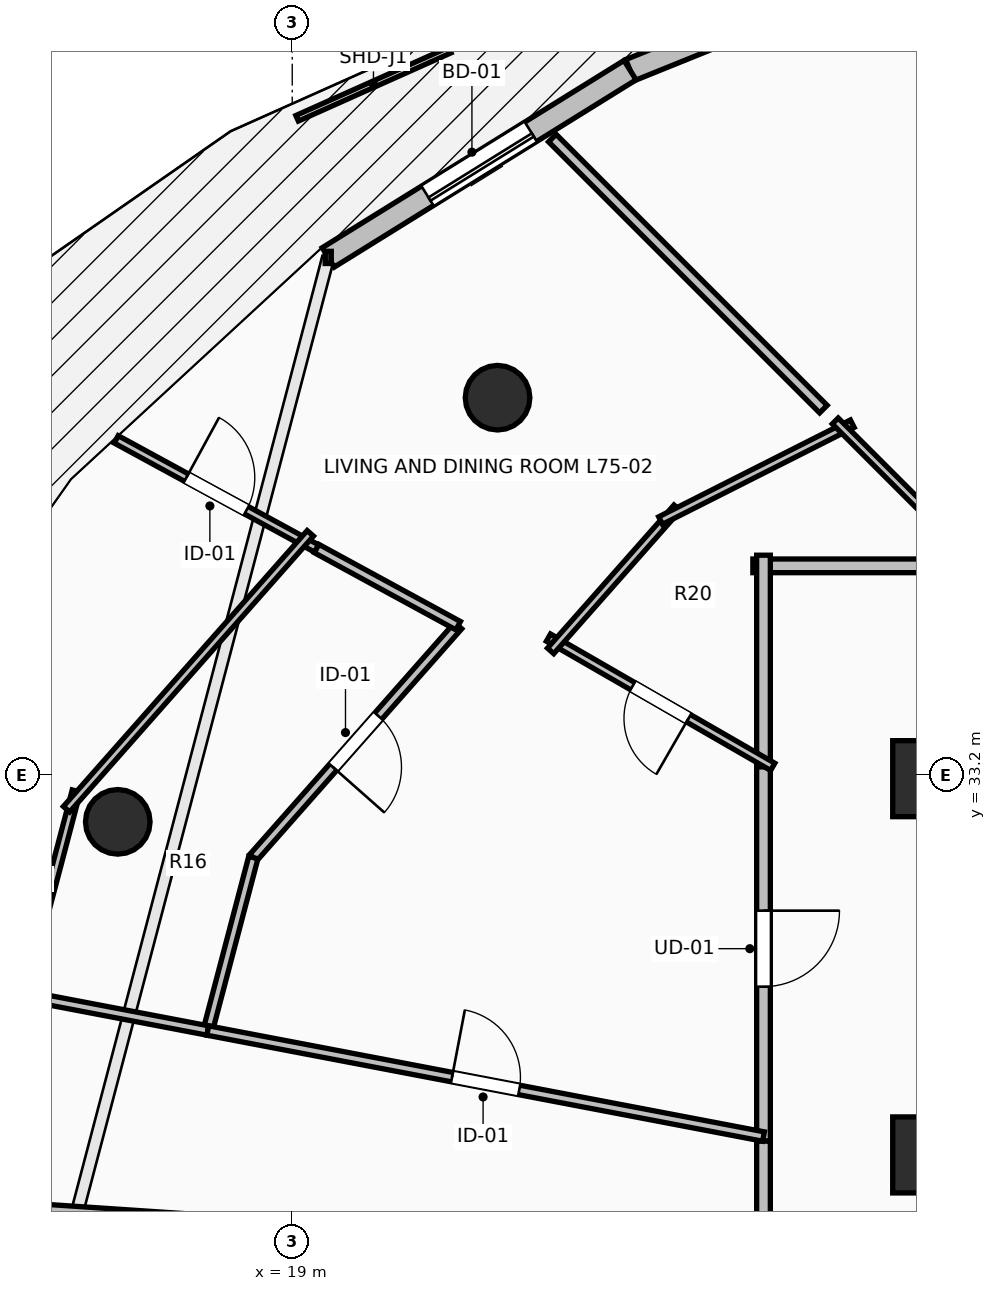
"""IFC4 building model, lengths in metres.
Left out: names, types, materials, properties, quantities, classifications, styles, units other than length and angle.
Written with IfcOpenShell. Run it as: python <this file> out.ifc"""

import sys

from ifc_helpers import new_model, si_unit, direction, frame, frame_2d, origin, origin_2d, place, context, subcontext, project, spatial, rectangle, circle, extrude, element, fill, save


model = new_model("IFC4")
c1 = context("Model", 3, precision=1e-05, world=origin(), true_north=direction((0.0, 1.0)))
c2 = subcontext(c1, "Body", "Model", "MODEL_VIEW")
j1 = project(units=[si_unit("LENGTHUNIT", "METRE"), si_unit("PLANEANGLEUNIT", "RADIAN")], contexts=[c1])
p1 = place(None, origin())
s1 = spatial("IfcSite", under=j1, at=p1, CompositionType="ELEMENT")
p2 = place(p1, origin())
s2 = spatial("IfcBuilding", under=s1, at=p2, CompositionType="ELEMENT")
p3 = place(p2, frame((0.0, 0.0, 276.85)))
s3 = spatial("IfcBuildingStorey", under=s2, at=p3, CompositionType="ELEMENT", Elevation=276.85)
for number, where, z_axis, x_axis in (
    (1, (21.701, 38.162, 0.0), (0.0, 0.0, 1.0), (-0.707, 0.707, 0.0)),
    (2, (16.705, 32.582, 0.0), (0.0, 0.0, 1.0), (-0.924, 0.383, 0.0)),
):
    element("IfcColumn", number, at=place(p3, frame(where, z_axis=z_axis, x_axis=x_axis)), inside=s3, PredefinedType="COLUMN", context=c2, shape_type="SweptSolid", body=[
        extrude(circle(Radius=0.425, at=origin_2d()), origin(), (0.0, 0.0, 1.0), 3.55),
    ])
for number, where, z_axis, x_axis in (
    (3, (27.25, 28.2, 0.0), (0.0, 0.0, 1.0), (1.0, 0.0, 0.0)),
    (4, (27.25, 33.15, 0.0), (0.0, 0.0, 1.0), (1.0, 0.0, 0.0)),
):
    element("IfcColumn", number, at=place(p3, frame(where, z_axis=z_axis, x_axis=x_axis)), inside=s3, PredefinedType="PILASTER", context=c2, shape_type="SweptSolid", body=[
        extrude(rectangle(XDim=0.7, YDim=1.0, at=origin_2d()), origin(), (0.0, 0.0, 1.0), 3.55),
    ])
p4 = place(p3, frame((27.974, 44.302, 0.0), z_axis=(0.0, 0.0, 1.0), x_axis=(-0.927147375511, -0.374696869594, 0.0)))
e5 = element("IfcWall", 5, at=p4, inside=s3, PredefinedType="STANDARD", context=c2, shape_type="SweptSolid", body=[
    extrude(rectangle(XDim=4.885, YDim=0.3, at=frame_2d((2.443, 0.0))), origin(), (0.0, 0.0, 1.0), 3.19),
])
p5 = place(p4, frame((1.843, 0.0, 0.85)))
e6 = element("IfcOpeningElement", 6, at=p5, cuts=e5, PredefinedType="OPENING", context=c2, shape_type="SweptSolid", body=[
    extrude(rectangle(XDim=1.2, YDim=2.1, at=frame_2d((0.6, 1.05))), frame((0.0, 0.165, 0.0), z_axis=(0.0, -1.0, 0.0), x_axis=(1.0, 0.0, 0.0)), (0.0, 0.0, 1.0), 0.33),
])
p6 = place(p3, frame((23.444, 42.471, 0.0), z_axis=(0.0, 0.0, 1.0), x_axis=(-0.849702323036, -0.527262707032, 0.0)))
e7 = element("IfcWall", 7, at=p6, inside=s3, PredefinedType="STANDARD", context=c2, shape_type="SweptSolid", body=[
    extrude(rectangle(XDim=4.672, YDim=0.3, at=frame_2d((2.336, 0.0))), origin(), (0.0, 0.0, 1.0), 3.19),
])
p7 = place(p6, frame((1.536, 0.0, 0.0)))
e8 = element("IfcOpeningElement", 8, at=p7, cuts=e7, PredefinedType="OPENING", context=c2, shape_type="SweptSolid", body=[
    extrude(rectangle(XDim=1.6, YDim=2.3, at=frame_2d((0.8, 1.15))), frame((0.0, 0.165, 0.0), z_axis=(0.0, -1.0, 0.0), x_axis=(1.0, 0.0, 0.0)), (0.0, 0.0, 1.0), 0.33),
])
p8 = place(p3, frame((25.2, 33.445, 0.0), z_axis=(0.0, 0.0, 1.0), x_axis=(0.0, -1.0, 0.0)))
e9 = element("IfcWall", 9, at=p8, inside=s3, PredefinedType="PARTITIONING", context=c2, shape_type="SweptSolid", body=[
    extrude(rectangle(XDim=5.063, YDim=0.18, at=frame_2d((2.531, 0.0))), origin(), (0.0, 0.0, 1.0), 2.382),
])
p9 = place(p8, frame((2.031, 0.0, 0.0)))
e10 = element("IfcOpeningElement", 10, at=p9, cuts=e9, PredefinedType="OPENING", context=c2, shape_type="SweptSolid", body=[
    extrude(rectangle(XDim=1.0, YDim=2.15, at=frame_2d((0.5, 1.075))), frame((0.0, 0.105, 0.0), z_axis=(0.0, -1.0, 0.0), x_axis=(1.0, 0.0, 0.0)), (0.0, 0.0, 1.0), 0.21),
])
p10 = place(p3, frame((28.25, 35.95, 0.0), z_axis=(0.0, 0.0, 1.0), x_axis=(-1.0, 0.0, 0.0)))
e11 = element("IfcWall", 11, at=p10, inside=s3, PredefinedType="PARTITIONING", context=c2, shape_type="SweptSolid", body=[
    extrude(rectangle(XDim=3.19, YDim=0.18, at=frame_2d((1.595, 0.0))), origin(), (0.0, 0.0, 1.0), 2.382),
])
p11 = place(p3, frame((25.2, 36.09, 0.0), z_axis=(0.0, 0.0, 1.0), x_axis=(0.0, -1.0, 0.0)))
e12 = element("IfcWall", 12, at=p11, inside=s3, PredefinedType="PARTITIONING", context=c2, shape_type="SweptSolid", body=[
    extrude(rectangle(XDim=2.785, YDim=0.18, at=frame_2d((1.393, 0.0))), origin(), (0.0, 0.0, 1.0), 2.382),
])
p12 = place(p3, frame((25.2, 28.382, 0.0), z_axis=(0.0, 0.0, 1.0), x_axis=(0.0, -1.0, 0.0)))
e13 = element("IfcWall", 13, at=p12, inside=s3, PredefinedType="PARTITIONING", context=c2, shape_type="SweptSolid", body=[
    extrude(rectangle(XDim=1.586, YDim=0.18, at=frame_2d((0.793, 0.0))), origin(), (0.0, 0.0, 1.0), 2.382),
])
p13 = place(p3, frame((25.321, 33.306, 0.0), z_axis=(0.0, 0.0, 1.0), x_axis=(-0.866517217622, 0.49914718427, 0.0)))
e14 = element("IfcWall", 14, at=p13, inside=s3, PredefinedType="PARTITIONING", context=c2, shape_type="SweptSolid", body=[
    extrude(rectangle(XDim=3.405, YDim=0.11, at=frame_2d((1.703, 0.0))), origin(), (0.0, 0.0, 1.0), 3.19),
])
p14 = place(p13, frame((1.278, 0.0, 0.0)))
e15 = element("IfcOpeningElement", 15, at=p14, cuts=e14, PredefinedType="OPENING", context=c2, shape_type="SweptSolid", body=[
    extrude(rectangle(XDim=0.85, YDim=2.1, at=frame_2d((0.425, 1.05))), frame((0.0, 0.07, 0.0), z_axis=(0.0, -1.0, 0.0), x_axis=(1.0, 0.0, 0.0)), (0.0, 0.0, 1.0), 0.14),
])
p15 = place(p3, frame((22.399, 34.831, 0.0), z_axis=(0.0, 0.0, 1.0), x_axis=(0.662292938072, 0.749244996099, 0.0)))
e16 = element("IfcWall", 16, at=p15, inside=s3, PredefinedType="PARTITIONING", context=c2, shape_type="SweptSolid", body=[
    extrude(rectangle(XDim=2.513, YDim=0.11, at=frame_2d((1.256, 0.0))), origin(), (0.0, 0.0, 1.0), 2.382),
])
p16 = place(p3, frame((23.846, 36.546, 0.0), z_axis=(0.0, 0.0, 1.0), x_axis=(0.892553076465, 0.450942352959, 0.0)))
e17 = element("IfcWall", 17, at=p16, inside=s3, PredefinedType="PARTITIONING", context=c2, shape_type="SweptSolid", body=[
    extrude(rectangle(XDim=2.826, YDim=0.11, at=frame_2d((1.413, 0.0))), origin(), (0.0, 0.0, 1.0), 2.382),
])
p17 = place(p3, frame((26.144, 37.856, 0.0), z_axis=(0.0, 0.0, 1.0), x_axis=(0.707106781187, -0.707106781187, 0.0)))
e18 = element("IfcWall", 18, at=p17, inside=s3, PredefinedType="PARTITIONING", context=c2, shape_type="SweptSolid", body=[
    extrude(rectangle(XDim=2.835, YDim=0.11, at=frame_2d((1.418, 0.0))), origin(), (0.0, 0.0, 1.0), 2.382),
])
p18 = place(p3, frame((16.684, 37.614, 0.0), z_axis=(0.0, 0.0, 1.0), x_axis=(0.878218537438, -0.478259553486, 0.0)))
e19 = element("IfcWall", 19, at=p18, inside=s3, PredefinedType="PARTITIONING", context=c2, shape_type="SweptSolid", body=[
    extrude(rectangle(XDim=3.003, YDim=0.11, at=frame_2d((1.501, 0.0))), origin(), (0.0, 0.0, 1.0), 3.19),
])
p19 = place(p18, frame((1.051, 0.0, 0.0)))
e20 = element("IfcOpeningElement", 20, at=p19, cuts=e19, PredefinedType="OPENING", context=c2, shape_type="SweptSolid", body=[
    extrude(rectangle(XDim=0.9, YDim=2.1, at=frame_2d((0.45, 1.05))), frame((0.0, 0.07, 0.0), z_axis=(0.0, -1.0, 0.0), x_axis=(1.0, 0.0, 0.0)), (0.0, 0.0, 1.0), 0.14),
])
p20 = place(p3, frame((21.183, 35.163, 0.0), z_axis=(0.0, 0.0, 1.0), x_axis=(-0.662034108956, -0.74947370773, 0.0)))
e21 = element("IfcWall", 21, at=p20, inside=s3, PredefinedType="PARTITIONING", context=c2, shape_type="SweptSolid", body=[
    extrude(rectangle(XDim=4.071, YDim=0.125, at=frame_2d((2.035, 0.0))), origin(), (0.0, 0.0, 1.0), 2.382),
])
p21 = place(p20, frame((1.585, 0.0, 0.0)))
e22 = element("IfcOpeningElement", 22, at=p21, cuts=e21, PredefinedType="OPENING", context=c2, shape_type="SweptSolid", body=[
    extrude(rectangle(XDim=0.9, YDim=2.1, at=frame_2d((0.45, 1.05))), frame((0.0, 0.077, 0.0), z_axis=(0.0, -1.0, 0.0), x_axis=(1.0, 0.0, 0.0)), (0.0, 0.0, 1.0), 0.155),
])
p22 = place(p3, frame((18.488, 32.112, 0.0), z_axis=(0.0, 0.0, 1.0), x_axis=(-0.254651639247, -0.967032854989, 0.0)))
e23 = element("IfcWall", 23, at=p22, inside=s3, PredefinedType="PARTITIONING", context=c2, shape_type="SweptSolid", body=[
    extrude(rectangle(XDim=2.353, YDim=0.125, at=frame_2d((1.176, 0.0))), origin(), (0.0, 0.0, 1.0), 2.382),
])
p23 = place(p3, frame((17.889, 29.837, 0.0), z_axis=(0.0, 0.0, 1.0), x_axis=(-0.982294524987, 0.187343177568, 0.0)))
e24 = element("IfcWall", 24, at=p23, inside=s3, PredefinedType="PARTITIONING", context=c2, shape_type="SweptSolid", body=[
    extrude(rectangle(XDim=2.282, YDim=0.125, at=frame_2d((1.141, 0.0))), origin(), (0.0, 0.0, 1.0), 2.774),
])
p24 = place(p3, frame((19.321, 36.177, 0.0), z_axis=(0.0, 0.0, 1.0), x_axis=(0.878172605495, -0.47834388776, 0.0)))
e25 = element("IfcWall", 25, at=p24, inside=s3, PredefinedType="PARTITIONING", context=c2, shape_type="SweptSolid", body=[
    extrude(rectangle(XDim=2.121, YDim=0.125, at=frame_2d((1.06, 0.0))), origin(), (0.0, 0.0, 1.0), 2.774),
])
p25 = place(p3, frame((17.889, 29.837, 0.0), z_axis=(0.0, 0.0, 1.0), x_axis=(0.982284262094, -0.187396980877, 0.0)))
e26 = element("IfcWall", 26, at=p25, inside=s3, PredefinedType="PARTITIONING", context=c2, shape_type="SweptSolid", body=[
    extrude(rectangle(XDim=7.443, YDim=0.125, at=frame_2d((3.721, 0.0))), origin(), (0.0, 0.0, 1.0), 3.19),
])
p26 = place(p25, frame((3.271, 0.0, 0.0)))
e27 = element("IfcOpeningElement", 27, at=p26, cuts=e26, PredefinedType="OPENING", context=c2, shape_type="SweptSolid", body=[
    extrude(rectangle(XDim=0.9, YDim=2.1, at=frame_2d((0.45, 1.05))), frame((0.0, 0.077, 0.0), z_axis=(0.0, -1.0, 0.0), x_axis=(1.0, 0.0, 0.0)), (0.0, 0.0, 1.0), 0.155),
])
p27 = place(p3, frame((15.415, 30.167, 0.0), z_axis=(0.0, 0.0, 1.0), x_axis=(0.254760975284, 0.967004056596, 0.0)))
e28 = element("IfcWall", 28, at=p27, inside=s3, PredefinedType="PARTITIONING", context=c2, shape_type="SweptSolid", body=[
    extrude(rectangle(XDim=2.918, YDim=0.11, at=frame_2d((1.459, 0.0))), origin(), (0.0, 0.0, 1.0), 3.19),
])
p28 = place(p3, frame((16.03, 32.748, 0.0), z_axis=(0.0, 0.0, 1.0), x_axis=(0.662164889187, 0.749358165051, 0.0)))
e29 = element("IfcWall", 29, at=p28, inside=s3, PredefinedType="PARTITIONING", context=c2, shape_type="SweptSolid", body=[
    extrude(rectangle(XDim=4.844, YDim=0.11, at=frame_2d((2.422, 0.0))), origin(), (0.0, 0.0, 1.0), 3.19),
])
p29 = place(p3, frame((12.027, 27.737, 0.0), z_axis=(0.0, 0.0, 1.0), x_axis=(0.997770487114, -0.066738707243, 0.0)))
e30 = element("IfcWall", 30, at=p29, inside=s3, PredefinedType="PARTITIONING", context=c2, shape_type="SweptSolid", body=[
    extrude(rectangle(XDim=13.202, YDim=0.125, at=frame_2d((6.601, 0.0))), origin(), (0.0, 0.0, 1.0), 2.382),
])
p30 = place(p3, frame((25.988, 38.012, 0.0), z_axis=(0.0, 0.0, 1.0), x_axis=(-0.707106781187, 0.707106781187, 0.0)))
e31 = element("IfcWall", 31, at=p30, inside=s3, PredefinedType="PARTITIONING", context=c2, shape_type="SweptSolid", body=[
    extrude(rectangle(XDim=5.043, YDim=0.14, at=frame_2d((2.521, 0.0))), origin(), (0.0, 0.0, 1.0), 2.774),
])
p31 = place(p7, origin())
e32 = element("IfcDoor", 32, at=p31, inside=s3, OperationType="SLIDING_TO_LEFT", PredefinedType="DOOR", context=c2, shape_type="SweptSolid", body=[
    extrude(rectangle(XDim=1.6, YDim=2.3, at=frame_2d((0.8, 1.15))), frame((0.0, 0.025, 0.0), z_axis=(0.0, -1.0, 0.0), x_axis=(1.0, 0.0, 0.0)), (0.0, 0.0, 1.0), 0.05),
])
fill(e8, e32)
p32 = place(p9, origin())
e33 = element("IfcDoor", 33, at=p32, inside=s3, OperationType="SINGLE_SWING_LEFT", PredefinedType="DOOR", context=c2, shape_type="SweptSolid", body=[
    extrude(rectangle(XDim=1.0, YDim=2.15, at=frame_2d((0.5, 1.075))), frame((0.0, 0.025, 0.0), z_axis=(0.0, -1.0, 0.0), x_axis=(1.0, 0.0, 0.0)), (0.0, 0.0, 1.0), 0.05),
])
fill(e10, e33)
p33 = place(p14, origin())
e34 = element("IfcDoor", 34, at=p33, inside=s3, OperationType="SINGLE_SWING_LEFT", PredefinedType="DOOR", context=c2, shape_type="SweptSolid", body=[
    extrude(rectangle(XDim=0.85, YDim=2.1, at=frame_2d((0.425, 1.05))), frame((0.0, 0.025, 0.0), z_axis=(0.0, -1.0, 0.0), x_axis=(1.0, 0.0, 0.0)), (0.0, 0.0, 1.0), 0.05),
])
fill(e15, e34)
p34 = place(p19, origin())
e35 = element("IfcDoor", 35, at=p34, inside=s3, OperationType="SINGLE_SWING_LEFT", PredefinedType="DOOR", context=c2, shape_type="SweptSolid", body=[
    extrude(rectangle(XDim=0.9, YDim=2.1, at=frame_2d((0.45, 1.05))), frame((0.0, 0.025, 0.0), z_axis=(0.0, -1.0, 0.0), x_axis=(1.0, 0.0, 0.0)), (0.0, 0.0, 1.0), 0.05),
])
fill(e20, e35)
p35 = place(p21, origin())
e36 = element("IfcDoor", 36, at=p35, inside=s3, OperationType="SINGLE_SWING_RIGHT", PredefinedType="DOOR", context=c2, shape_type="SweptSolid", body=[
    extrude(rectangle(XDim=0.9, YDim=2.1, at=frame_2d((0.45, 1.05))), frame((0.0, 0.025, 0.0), z_axis=(0.0, -1.0, 0.0), x_axis=(1.0, 0.0, 0.0)), (0.0, 0.0, 1.0), 0.05),
])
fill(e22, e36)
p36 = place(p26, origin())
e37 = element("IfcDoor", 37, at=p36, inside=s3, OperationType="SINGLE_SWING_LEFT", PredefinedType="DOOR", context=c2, shape_type="SweptSolid", body=[
    extrude(rectangle(XDim=0.9, YDim=2.1, at=frame_2d((0.45, 1.05))), frame((0.0, 0.025, 0.0), z_axis=(0.0, -1.0, 0.0), x_axis=(1.0, 0.0, 0.0)), (0.0, 0.0, 1.0), 0.05),
])
fill(e27, e37)
save(model, sys.argv[1])
